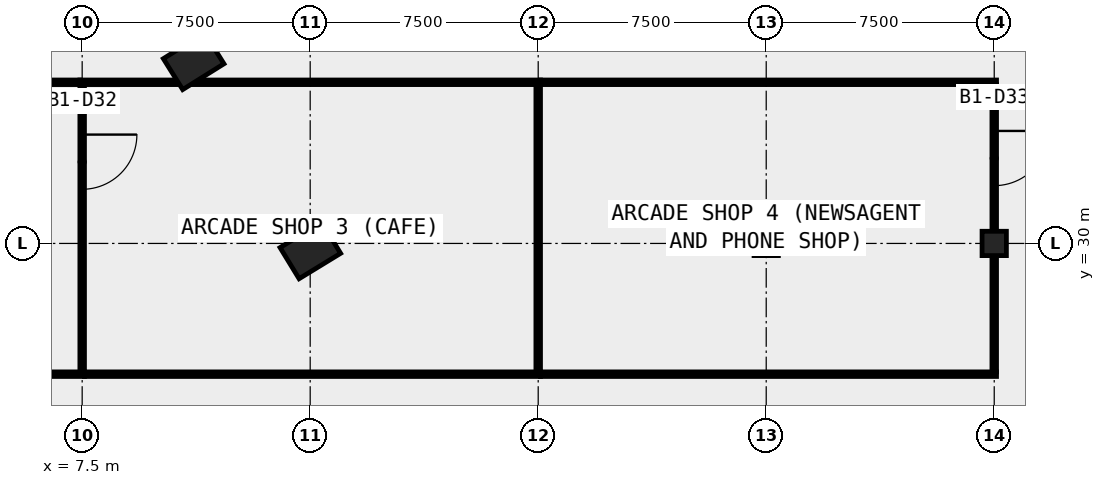
"""IFC4 building model, lengths in metres.
Left out: names, types, materials, properties, quantities, classifications, styles, units other than length and angle.
Written with IfcOpenShell. Run it as: python <this file> out.ifc"""

import sys

from ifc_helpers import new_model, si_unit, direction, frame, frame_2d, origin, origin_2d, place, context, subcontext, project, spatial, rectangle, extrude, element, fill, save


model = new_model("IFC4")
c1 = context("Model", 3, precision=1e-05, world=origin(), true_north=direction((0.0, 1.0)))
c2 = subcontext(c1, "Body", "Model", "MODEL_VIEW")
j1 = project(units=[si_unit("LENGTHUNIT", "METRE"), si_unit("PLANEANGLEUNIT", "RADIAN")], contexts=[c1])
p1 = place(None, origin())
s1 = spatial("IfcSite", under=j1, at=p1, CompositionType="ELEMENT")
p2 = place(p1, origin())
s2 = spatial("IfcBuilding", under=s1, at=p2, CompositionType="ELEMENT")
p3 = place(p2, frame((0.0, 0.0, -5.5)))
s3 = spatial("IfcBuildingStorey", under=s2, at=p3, CompositionType="ELEMENT", Elevation=-5.5)
for number, where, z_axis, x_axis in (
    (1, (30.0, 30.0, -0.42), (0.0, 0.0, 1.0), (1.0, 0.0, 0.0)),
    (2, (37.5, 30.0, -0.42), (0.0, 0.0, 1.0), (1.0, 0.0, 0.0)),
):
    element("IfcColumn", number, at=place(p3, frame(where, z_axis=z_axis, x_axis=x_axis)), inside=s3, PredefinedType="COLUMN", context=c2, shape_type="SweptSolid", body=[
        extrude(rectangle(XDim=0.8, YDim=0.8, at=origin_2d()), origin(), (0.0, 0.0, 1.0), 5.72),
    ])
for number, where, z_axis, x_axis in (
    (3, (15.005, 29.769, -0.42), (0.0, 0.0, 1.0), (-0.522, 0.853, 0.0)),
    (4, (11.167, 35.993, -0.42), (0.0, 0.0, 1.0), (-0.53, 0.848, 0.0)),
):
    element("IfcColumn", number, at=place(p3, frame(where, z_axis=z_axis, x_axis=x_axis)), inside=s3, PredefinedType="COLUMN", context=c2, shape_type="SweptSolid", body=[
        extrude(rectangle(XDim=1.2, YDim=1.6, at=origin_2d()), origin(), (0.0, 0.0, 1.0), 5.42),
    ])
p4 = place(p3, frame((2.0, 35.3, 0.0), z_axis=(0.0, 0.0, 1.0), x_axis=(1.0, 0.0, 0.0)))
e5 = element("IfcWall", 5, at=p4, inside=s3, PredefinedType="PARTITIONING", context=c2, shape_type="SweptSolid", body=[
    extrude(rectangle(XDim=5.425, YDim=0.15, at=frame_2d((2.712, 0.0))), origin(), (0.0, 0.0, 1.0), 4.9),
])
p5 = place(p3, frame((7.575, 25.7, 0.0), z_axis=(0.0, 0.0, 1.0), x_axis=(-1.0, 0.0, 0.0)))
e6 = element("IfcWall", 6, at=p5, inside=s3, PredefinedType="PARTITIONING", context=c2, shape_type="SweptSolid", body=[
    extrude(rectangle(XDim=15.0, YDim=0.15, at=frame_2d((7.5, 0.0))), origin(), (0.0, 0.0, 1.0), 4.9),
])
p6 = place(p5, frame((6.405, 0.0, 0.0)))
e7 = element("IfcOpeningElement", 7, at=p6, cuts=e6, PredefinedType="OPENING", context=c2, shape_type="SweptSolid", body=[
    extrude(rectangle(XDim=1.8, YDim=2.1, at=frame_2d((0.9, 1.05))), frame((0.0, 0.085, 0.0), z_axis=(0.0, -1.0, 0.0), x_axis=(1.0, 0.0, 0.0)), (0.0, 0.0, 1.0), 0.17),
])
p7 = place(p3, frame((7.425, 35.3, 0.0), z_axis=(0.0, 0.0, 1.0), x_axis=(1.0, 0.0, 0.0)))
e8 = element("IfcWall", 8, at=p7, inside=s3, PredefinedType="PARTITIONING", context=c2, shape_type="SweptSolid", body=[
    extrude(rectangle(XDim=15.15, YDim=0.15, at=frame_2d((7.575, 0.0))), origin(), (0.0, 0.0, 1.0), 4.9),
])
for number, where, z_axis, x_axis in (
    (9, (22.575, 25.7, 0.0), (0.0, 0.0, 1.0), (-1.0, 0.0, 0.0)),
    (10, (22.575, 35.3, 0.0), (0.0, 0.0, 1.0), (1.0, 0.0, 0.0)),
):
    element("IfcWall", number, at=place(p3, frame(where, z_axis=z_axis, x_axis=x_axis)), inside=s3, PredefinedType="PARTITIONING", context=c2, shape_type="SweptSolid", body=[
        extrude(rectangle(XDim=15.0, YDim=0.15, at=frame_2d((7.5, 0.0))), origin(), (0.0, 0.0, 1.0), 4.9),
    ])
p8 = place(p3, frame((37.5, 35.225, 0.0), z_axis=(0.0, 0.0, 1.0), x_axis=(0.0, -1.0, 0.0)))
e11 = element("IfcWall", 11, at=p8, inside=s3, PredefinedType="PARTITIONING", context=c2, shape_type="SweptSolid", body=[
    extrude(rectangle(XDim=9.45, YDim=0.15, at=frame_2d((4.725, 0.0))), origin(), (0.0, 0.0, 1.0), 4.9),
])
p9 = place(p8, frame((1.525, 0.0, 0.0)))
e12 = element("IfcOpeningElement", 12, at=p9, cuts=e11, PredefinedType="OPENING", context=c2, shape_type="SweptSolid", body=[
    extrude(rectangle(XDim=1.8, YDim=2.1, at=frame_2d((0.9, 1.05))), frame((0.0, 0.085, 0.0), z_axis=(0.0, -1.0, 0.0), x_axis=(1.0, 0.0, 0.0)), (0.0, 0.0, 1.0), 0.17),
])
p10 = place(p3, frame((37.575, 25.7, 0.0), z_axis=(0.0, 0.0, 1.0), x_axis=(-1.0, 0.0, 0.0)))
e13 = element("IfcWall", 13, at=p10, inside=s3, PredefinedType="PARTITIONING", context=c2, shape_type="SweptSolid", body=[
    extrude(rectangle(XDim=15.0, YDim=0.15, at=frame_2d((7.5, 0.0))), origin(), (0.0, 0.0, 1.0), 4.9),
])
p11 = place(p3, frame((7.5, 35.3, 0.0), z_axis=(0.0, 0.0, 1.0), x_axis=(0.0, -1.0, 0.0)))
e14 = element("IfcWall", 14, at=p11, inside=s3, PredefinedType="PARTITIONING", context=c2, shape_type="SweptSolid", body=[
    extrude(rectangle(XDim=9.525, YDim=0.15, at=frame_2d((4.763, 0.0))), origin(), (0.0, 0.0, 1.0), 4.9),
])
p12 = place(p11, frame((1.72, 0.0, 0.0)))
e15 = element("IfcOpeningElement", 15, at=p12, cuts=e14, PredefinedType="OPENING", context=c2, shape_type="SweptSolid", body=[
    extrude(rectangle(XDim=1.8, YDim=2.1, at=frame_2d((0.9, 1.05))), frame((0.0, 0.085, 0.0), z_axis=(0.0, -1.0, 0.0), x_axis=(1.0, 0.0, 0.0)), (0.0, 0.0, 1.0), 0.17),
])
p13 = place(p3, frame((22.5, 35.225, 0.0), z_axis=(0.0, 0.0, 1.0), x_axis=(0.0, -1.0, 0.0)))
e16 = element("IfcWall", 16, at=p13, inside=s3, PredefinedType="PARTITIONING", context=c2, shape_type="SweptSolid", body=[
    extrude(rectangle(XDim=9.45, YDim=0.15, at=frame_2d((4.725, 0.0))), origin(), (0.0, 0.0, 1.0), 4.9),
])
p14 = place(p12, origin())
e17 = element("IfcDoor", 17, at=p14, inside=s3, OperationType="DOUBLE_DOOR_SINGLE_SWING", PredefinedType="DOOR", context=c2, shape_type="SweptSolid", body=[
    extrude(rectangle(XDim=1.8, YDim=2.1, at=frame_2d((0.9, 1.05))), frame((0.0, 0.025, 0.0), z_axis=(0.0, -1.0, 0.0), x_axis=(1.0, 0.0, 0.0)), (0.0, 0.0, 1.0), 0.05),
])
fill(e15, e17)
p15 = place(p9, origin())
e18 = element("IfcDoor", 18, at=p15, inside=s3, OperationType="DOUBLE_DOOR_SINGLE_SWING", PredefinedType="DOOR", context=c2, shape_type="SweptSolid", body=[
    extrude(rectangle(XDim=1.8, YDim=2.1, at=frame_2d((0.9, 1.05))), frame((0.0, 0.025, 0.0), z_axis=(0.0, -1.0, 0.0), x_axis=(1.0, 0.0, 0.0)), (0.0, 0.0, 1.0), 0.05),
])
fill(e12, e18)
save(model, sys.argv[1])
